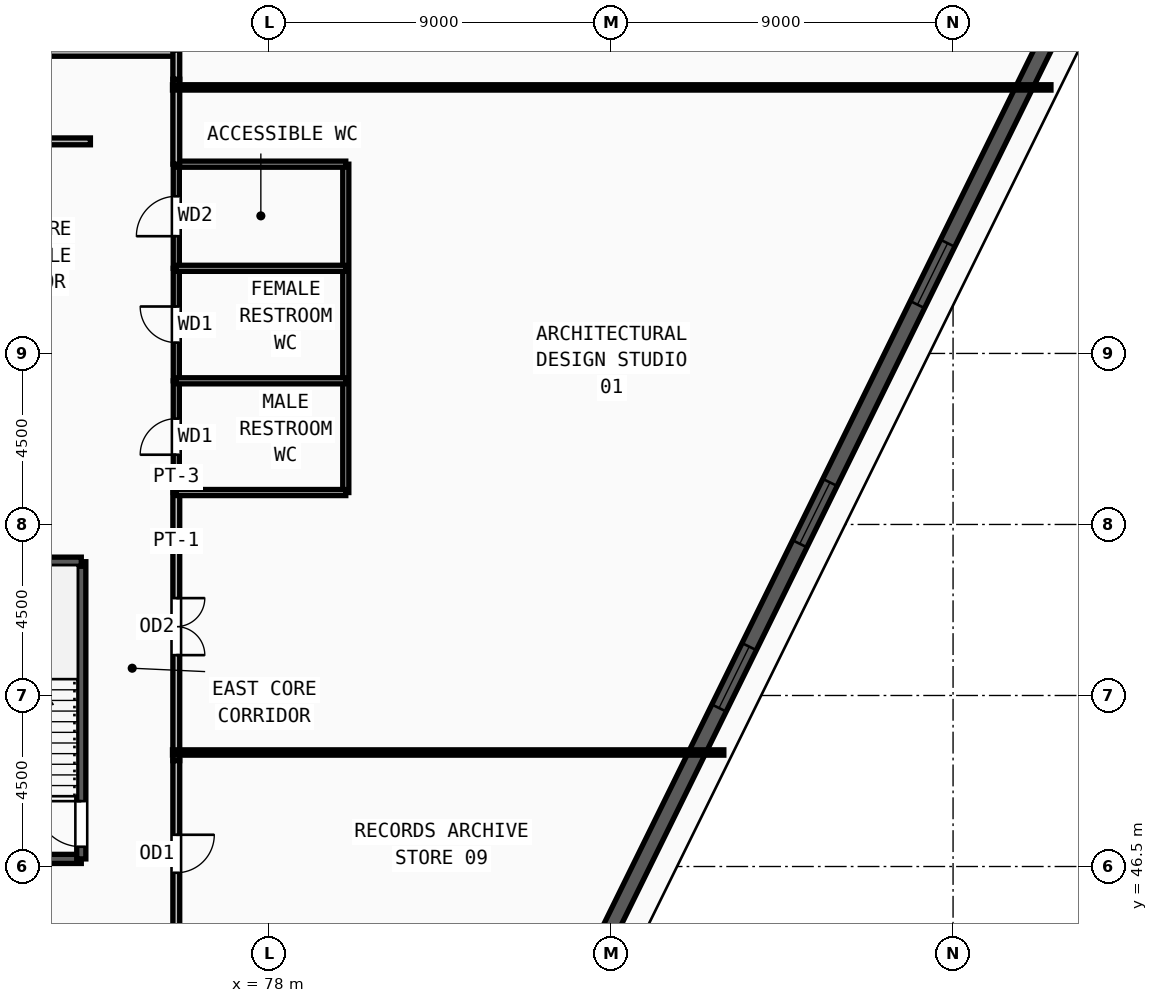
"""IFC4 building model, lengths in metres.
Left out: names, types, materials, properties, quantities, classifications, styles, units other than length and angle.
Written with IfcOpenShell. Run it as: python <this file> out.ifc"""

import sys

from ifc_helpers import new_model, si_unit, direction, frame, frame_2d, origin, place, context, subcontext, project, spatial, rectangle, extrude, source, transform, mapped, element, fill, save


model = new_model("IFC4")
c1 = context("Model", 3, precision=1e-05, world=origin(), true_north=direction((0.0, 1.0)))
c2 = subcontext(c1, "Body", "Model", "MODEL_VIEW")
j1 = project(units=[si_unit("LENGTHUNIT", "METRE"), si_unit("PLANEANGLEUNIT", "RADIAN")], contexts=[c1])
p1 = place(None, origin())
s1 = spatial("IfcSite", under=j1, at=p1, CompositionType="ELEMENT")
p2 = place(p1, origin())
s2 = spatial("IfcBuilding", under=s1, at=p2, CompositionType="ELEMENT")
p3 = place(p2, frame((0.0, 0.0, 39.75)))
s3 = spatial("IfcBuildingStorey", under=s2, at=p3, CompositionType="ELEMENT", Elevation=39.75)
p4 = place(p3, frame((86.172, 43.21, 0.0), z_axis=(0.0, 0.0, 1.0), x_axis=(0.441367208162, 0.897326577985, 0.0)))
e1 = element("IfcWall", 1, at=p4, inside=s3, PredefinedType="SOLIDWALL", context=c2, shape_type="SweptSolid", body=[
    extrude(rectangle(XDim=28.058, YDim=0.42, at=frame_2d((14.029, 0.0))), origin(), (0.0, 0.0, 1.0), 3.57),
])
m1 = source(origin(), c2, "Body", "SweptSolid", [
    extrude(rectangle(XDim=1.8, YDim=1.95, at=frame_2d((0.9, 0.975))), frame((0.0, 0.22, 0.0), z_axis=(0.0, -1.0, 0.0), x_axis=(1.0, 0.0, 0.0)), (0.0, 0.0, 1.0), 0.44),
])
p5 = place(p4, frame((8.314, 0.0, 0.55)))
e2 = element("IfcOpeningElement", 2, at=p5, cuts=e1, PredefinedType="OPENING", context=c2, shape_type="MappedRepresentation", body=[
    mapped(m1, transform((0.0, 0.0, 0.0), x_axis=(1.0, 0.0, 0.0), y_axis=(0.0, 1.0, 0.0), z_axis=(0.0, 0.0, 1.0), scale=1.0)),
])
p6 = place(p4, frame((13.129, 0.0, 0.55)))
e3 = element("IfcOpeningElement", 3, at=p6, cuts=e1, PredefinedType="OPENING", context=c2, shape_type="MappedRepresentation", body=[
    mapped(m1, transform((0.0, 0.0, 0.0), x_axis=(1.0, 0.0, 0.0), y_axis=(0.0, 1.0, 0.0), z_axis=(0.0, 0.0, 1.0), scale=1.0)),
])
p7 = place(p4, frame((20.143, 0.0, 0.55)))
e4 = element("IfcOpeningElement", 4, at=p7, cuts=e1, PredefinedType="OPENING", context=c2, shape_type="MappedRepresentation", body=[
    mapped(m1, transform((0.0, 0.0, 0.0), x_axis=(1.0, 0.0, 0.0), y_axis=(0.0, 1.0, 0.0), z_axis=(0.0, 0.0, 1.0), scale=1.0)),
])
p8 = place(p3, frame((69.62, 46.7, 0.0), z_axis=(0.0, 0.0, 1.0), x_axis=(1.0, 0.0, 0.0)))
e5 = element("IfcWall", 5, at=p8, inside=s3, PredefinedType="SOLIDWALL", context=c2, shape_type="SweptSolid", body=[
    extrude(rectangle(XDim=3.44, YDim=0.24, at=frame_2d((1.72, 0.0))), origin(), (0.0, 0.0, 1.0), 3.57),
])
p9 = place(p3, frame((73.06, 46.7, 0.0), z_axis=(0.0, 0.0, 1.0), x_axis=(0.0, 1.0, 0.0)))
e6 = element("IfcWall", 6, at=p9, inside=s3, PredefinedType="SOLIDWALL", context=c2, shape_type="SweptSolid", body=[
    extrude(rectangle(XDim=7.82, YDim=0.24, at=frame_2d((3.91, 0.0))), origin(), (0.0, 0.0, 1.0), 3.57),
])
m2 = source(origin(), c2, "Body", "SweptSolid", [
    extrude(rectangle(XDim=1.2, YDim=2.2, at=frame_2d((0.6, 1.1))), frame((0.0, 0.13, 0.0), z_axis=(0.0, -1.0, 0.0), x_axis=(1.0, 0.0, 0.0)), (0.0, 0.0, 1.0), 0.26),
])
p10 = place(p9, frame((0.32, 0.0, 0.0)))
e7 = element("IfcOpeningElement", 7, at=p10, cuts=e6, PredefinedType="OPENING", context=c2, shape_type="MappedRepresentation", body=[
    mapped(m2, transform((0.0, 0.0, 0.0), x_axis=(1.0, 0.0, 0.0), y_axis=(0.0, 1.0, 0.0), z_axis=(0.0, 0.0, 1.0), scale=1.0)),
])
p11 = place(p3, frame((73.06, 54.52, 0.0), z_axis=(0.0, 0.0, 1.0), x_axis=(-1.0, 0.0, 0.0)))
e8 = element("IfcWall", 8, at=p11, inside=s3, PredefinedType="SOLIDWALL", context=c2, shape_type="SweptSolid", body=[
    extrude(rectangle(XDim=3.44, YDim=0.24, at=frame_2d((1.72, 0.0))), origin(), (0.0, 0.0, 1.0), 3.57),
])
p12 = place(p3, frame((75.56, 56.34, 0.0), z_axis=(0.0, 0.0, 1.0), x_axis=(0.0, 1.0, 0.0)))
e9 = element("IfcWall", 9, at=p12, inside=s3, PredefinedType="PARTITIONING", context=c2, shape_type="SweptSolid", body=[
    extrude(rectangle(XDim=2.94, YDim=0.16, at=frame_2d((1.47, 0.0))), origin(), (0.0, 0.0, 1.0), 3.57),
])
m3 = source(origin(), c2, "Body", "SweptSolid", [
    extrude(rectangle(XDim=0.95, YDim=2.15, at=frame_2d((0.475, 1.075))), frame((0.0, 0.09, 0.0), z_axis=(0.0, -1.0, 0.0), x_axis=(1.0, 0.0, 0.0)), (0.0, 0.0, 1.0), 0.18),
])
p13 = place(p12, frame((0.995, 0.0, 0.0)))
e10 = element("IfcOpeningElement", 10, at=p13, cuts=e9, PredefinedType="OPENING", context=c2, shape_type="MappedRepresentation", body=[
    mapped(m3, transform((0.0, 0.0, 0.0), x_axis=(1.0, 0.0, 0.0), y_axis=(0.0, 1.0, 0.0), z_axis=(0.0, 0.0, 1.0), scale=1.0)),
])
p14 = place(p3, frame((75.56, 59.28, 0.0), z_axis=(0.0, 0.0, 1.0), x_axis=(0.0, 1.0, 0.0)))
e11 = element("IfcWall", 11, at=p14, inside=s3, PredefinedType="PARTITIONING", context=c2, shape_type="SweptSolid", body=[
    extrude(rectangle(XDim=2.96, YDim=0.16, at=frame_2d((1.48, 0.0))), origin(), (0.0, 0.0, 1.0), 3.57),
])
p15 = place(p14, frame((1.005, 0.0, 0.0)))
e12 = element("IfcOpeningElement", 12, at=p15, cuts=e11, PredefinedType="OPENING", context=c2, shape_type="MappedRepresentation", body=[
    mapped(m3, transform((0.0, 0.0, 0.0), x_axis=(1.0, 0.0, 0.0), y_axis=(0.0, 1.0, 0.0), z_axis=(0.0, 0.0, 1.0), scale=1.0)),
])
p16 = place(p3, frame((75.56, 62.24, 0.0), z_axis=(0.0, 0.0, 1.0), x_axis=(0.0, 1.0, 0.0)))
e13 = element("IfcWall", 13, at=p16, inside=s3, PredefinedType="PARTITIONING", context=c2, shape_type="SweptSolid", body=[
    extrude(rectangle(XDim=2.74, YDim=0.16, at=frame_2d((1.37, 0.0))), origin(), (0.0, 0.0, 1.0), 3.57),
])
m4 = source(origin(), c2, "Body", "SweptSolid", [
    extrude(rectangle(XDim=1.05, YDim=2.15, at=frame_2d((0.525, 1.075))), frame((0.0, 0.09, 0.0), z_axis=(0.0, -1.0, 0.0), x_axis=(1.0, 0.0, 0.0)), (0.0, 0.0, 1.0), 0.18),
])
p17 = place(p16, frame((0.845, 0.0, 0.0)))
e14 = element("IfcOpeningElement", 14, at=p17, cuts=e13, PredefinedType="OPENING", context=c2, shape_type="MappedRepresentation", body=[
    mapped(m4, transform((0.0, 0.0, 0.0), x_axis=(1.0, 0.0, 0.0), y_axis=(0.0, 1.0, 0.0), z_axis=(0.0, 0.0, 1.0), scale=1.0)),
])
p18 = place(p3, frame((69.46, 65.58, 0.0), z_axis=(0.0, 0.0, 1.0), x_axis=(1.0, 0.0, 0.0)))
e15 = element("IfcWall", 15, at=p18, inside=s3, PredefinedType="PARTITIONING", context=c2, shape_type="SweptSolid", body=[
    extrude(rectangle(XDim=3.84, YDim=0.18, at=frame_2d((1.92, 0.0))), origin(), (0.0, 0.0, 1.0), 3.57),
])
m5 = source(origin(), c2, "Body", "SweptSolid", [
    extrude(rectangle(XDim=1.3, YDim=2.2, at=frame_2d((0.65, 1.1))), frame((0.0, 0.1, 0.0), z_axis=(0.0, -1.0, 0.0), x_axis=(1.0, 0.0, 0.0)), (0.0, 0.0, 1.0), 0.2),
])
p19 = place(p18, frame((1.27, 0.0, 0.0)))
e16 = element("IfcOpeningElement", 16, at=p19, cuts=e15, PredefinedType="OPENING", context=c2, shape_type="MappedRepresentation", body=[
    mapped(m5, transform((0.0, 0.0, 0.0), x_axis=(1.0, 0.0, 0.0), y_axis=(0.0, 1.0, 0.0), z_axis=(0.0, 0.0, 1.0), scale=1.0)),
])
p20 = place(p3, frame((75.56, 56.34, 0.0), z_axis=(0.0, 0.0, 1.0), x_axis=(0.0, -1.0, 0.0)))
e17 = element("IfcWall", 17, at=p20, inside=s3, PredefinedType="PARTITIONING", context=c2, shape_type="SweptSolid", body=[
    extrude(rectangle(XDim=7.055, YDim=0.18, at=frame_2d((3.528, 0.0))), origin(), (0.0, 0.0, 1.0), 3.57),
])
m6 = source(origin(), c2, "Body", "SweptSolid", [
    extrude(rectangle(XDim=1.5, YDim=2.2, at=frame_2d((0.75, 1.1))), frame((0.0, 0.1, 0.0), z_axis=(0.0, -1.0, 0.0), x_axis=(1.0, 0.0, 0.0)), (0.0, 0.0, 1.0), 0.2),
])
p21 = place(p20, frame((2.778, 0.0, 0.0)))
e18 = element("IfcOpeningElement", 18, at=p21, cuts=e17, PredefinedType="OPENING", context=c2, shape_type="MappedRepresentation", body=[
    mapped(m6, transform((0.0, 0.0, 0.0), x_axis=(1.0, 0.0, 0.0), y_axis=(0.0, 1.0, 0.0), z_axis=(0.0, 0.0, 1.0), scale=1.0)),
])
p22 = place(p3, frame((55.785, 67.91, 0.0), z_axis=(0.0, 0.0, 1.0), x_axis=(1.0, 0.0, 0.0)))
e19 = element("IfcWall", 19, at=p22, inside=s3, PredefinedType="PARTITIONING", context=c2, shape_type="SweptSolid", body=[
    extrude(rectangle(XDim=19.845, YDim=0.18, at=frame_2d((9.922, 0.0))), origin(), (0.0, 0.0, 1.0), 3.57),
])
p23 = place(p22, frame((9.172, 0.0, 0.0)))
e20 = element("IfcOpeningElement", 20, at=p23, cuts=e19, PredefinedType="OPENING", context=c2, shape_type="MappedRepresentation", body=[
    mapped(m6, transform((0.0, 0.0, 0.0), x_axis=(1.0, 0.0, 0.0), y_axis=(0.0, 1.0, 0.0), z_axis=(0.0, 0.0, 1.0), scale=1.0)),
])
p24 = place(p3, frame((75.56, 49.285, 0.0), z_axis=(0.0, 0.0, 1.0), x_axis=(0.0, -1.0, 0.0)))
e21 = element("IfcWall", 21, at=p24, inside=s3, PredefinedType="PARTITIONING", context=c2, shape_type="SweptSolid", body=[
    extrude(rectangle(XDim=4.9, YDim=0.18, at=frame_2d((2.45, 0.0))), origin(), (0.0, 0.0, 1.0), 3.57),
])
m7 = source(origin(), c2, "Body", "SweptSolid", [
    extrude(rectangle(XDim=1.0, YDim=2.2, at=frame_2d((0.5, 1.1))), frame((0.0, 0.1, 0.0), z_axis=(0.0, -1.0, 0.0), x_axis=(1.0, 0.0, 0.0)), (0.0, 0.0, 1.0), 0.2),
])
p25 = place(p24, frame((1.95, 0.0, 0.0)))
e22 = element("IfcOpeningElement", 22, at=p25, cuts=e21, PredefinedType="OPENING", context=c2, shape_type="MappedRepresentation", body=[
    mapped(m7, transform((0.0, 0.0, 0.0), x_axis=(1.0, 0.0, 0.0), y_axis=(0.0, 1.0, 0.0), z_axis=(0.0, 0.0, 1.0), scale=1.0)),
])
p26 = place(p3, frame((80.02, 56.34, 0.0), z_axis=(0.0, 0.0, 1.0), x_axis=(0.0, 1.0, 0.0)))
e23 = element("IfcWall", 23, at=p26, inside=s3, PredefinedType="PARTITIONING", context=c2, shape_type="SweptSolid", body=[
    extrude(rectangle(XDim=8.64, YDim=0.16, at=frame_2d((4.32, 0.0))), origin(), (0.0, 0.0, 1.0), 3.57),
])
for number, where, z_axis, x_axis in (
    (24, (75.56, 56.34, 0.0), (0.0, 0.0, 1.0), (1.0, 0.0, 0.0)),
    (25, (75.56, 59.28, 0.0), (0.0, 0.0, 1.0), (1.0, 0.0, 0.0)),
    (26, (75.56, 62.24, 0.0), (0.0, 0.0, 1.0), (1.0, 0.0, 0.0)),
    (27, (75.56, 64.98, 0.0), (0.0, 0.0, 1.0), (1.0, 0.0, 0.0)),
):
    element("IfcWall", number, at=place(p3, frame(where, z_axis=z_axis, x_axis=x_axis)), inside=s3, PredefinedType="PARTITIONING", context=c2, shape_type="SweptSolid", body=[
        extrude(rectangle(XDim=4.46, YDim=0.16, at=frame_2d((2.23, 0.0))), origin(), (0.0, 0.0, 1.0), 3.57),
    ])
p27 = place(p3, frame((75.56, 67.215, 0.0), z_axis=(0.0, 0.0, 1.0), x_axis=(0.0, -1.0, 0.0)))
e28 = element("IfcWall", 28, at=p27, inside=s3, PredefinedType="PARTITIONING", context=c2, shape_type="SweptSolid", body=[
    extrude(rectangle(XDim=2.235, YDim=0.18, at=frame_2d((1.118, 0.0))), origin(), (0.0, 0.0, 1.0), 3.57),
])
p28 = place(p3, frame((75.56, 67.98, 0.0), z_axis=(0.0, 0.0, 1.0), x_axis=(0.0, -1.0, 0.0)))
e29 = element("IfcWall", 29, at=p28, inside=s3, PredefinedType="PARTITIONING", context=c2, shape_type="SweptSolid", body=[
    extrude(rectangle(XDim=0.765, YDim=0.18, at=frame_2d((0.382, 0.0))), origin(), (0.0, 0.0, 1.0), 3.57),
])
p29 = place(p3, frame((75.46, 49.5, 0.0), z_axis=(0.0, 0.0, 1.0), x_axis=(1.0, 0.0, 0.0)))
e30 = element("IfcWall", 30, at=p29, inside=s3, PredefinedType="PARTITIONING", context=c2, shape_type="SweptSolid", body=[
    extrude(rectangle(XDim=14.508, YDim=0.14, at=frame_2d((7.254, 0.0))), origin(), (0.0, 0.0, 1.0), 3.57),
])
p30 = place(p3, frame((75.46, 67.0, 0.0), z_axis=(0.0, 0.0, 1.0), x_axis=(1.0, 0.0, 0.0)))
e31 = element("IfcWall", 31, at=p30, inside=s3, PredefinedType="PARTITIONING", context=c2, shape_type="SweptSolid", body=[
    extrude(rectangle(XDim=23.116, YDim=0.14, at=frame_2d((11.558, 0.0))), origin(), (0.0, 0.0, 1.0), 2.655),
])
m8 = source(origin(), c2, "Body", "SweptSolid", [
    extrude(rectangle(XDim=1.8, YDim=1.95, at=frame_2d((0.9, 0.975))), frame((0.0, 0.03, 0.0), z_axis=(0.0, -1.0, 0.0), x_axis=(1.0, 0.0, 0.0)), (0.0, 0.0, 1.0), 0.06),
])
p31 = place(p5, origin())
e32 = element("IfcWindow", 32, at=p31, inside=s3, PartitioningType="DOUBLE_PANEL_VERTICAL", PredefinedType="WINDOW", context=c2, shape_type="MappedRepresentation", body=[
    mapped(m8, transform((0.0, 0.0, 0.0), x_axis=(1.0, 0.0, 0.0), y_axis=(0.0, 1.0, 0.0), z_axis=(0.0, 0.0, 1.0), scale=1.0)),
])
fill(e2, e32)
p32 = place(p6, origin())
e33 = element("IfcWindow", 33, at=p32, inside=s3, PartitioningType="DOUBLE_PANEL_VERTICAL", PredefinedType="WINDOW", context=c2, shape_type="MappedRepresentation", body=[
    mapped(m8, transform((0.0, 0.0, 0.0), x_axis=(1.0, 0.0, 0.0), y_axis=(0.0, 1.0, 0.0), z_axis=(0.0, 0.0, 1.0), scale=1.0)),
])
fill(e3, e33)
p33 = place(p7, origin())
e34 = element("IfcWindow", 34, at=p33, inside=s3, PartitioningType="DOUBLE_PANEL_VERTICAL", PredefinedType="WINDOW", context=c2, shape_type="MappedRepresentation", body=[
    mapped(m8, transform((0.0, 0.0, 0.0), x_axis=(1.0, 0.0, 0.0), y_axis=(0.0, 1.0, 0.0), z_axis=(0.0, 0.0, 1.0), scale=1.0)),
])
fill(e4, e34)
m9 = source(origin(), c2, "Body", "SweptSolid", [
    extrude(rectangle(XDim=1.2, YDim=2.2, at=frame_2d((0.6, 1.1))), frame((0.0, 0.025, 0.0), z_axis=(0.0, -1.0, 0.0), x_axis=(1.0, 0.0, 0.0)), (0.0, 0.0, 1.0), 0.05),
])
p34 = place(p10, origin())
e35 = element("IfcDoor", 35, at=p34, inside=s3, OperationType="SINGLE_SWING_RIGHT", PredefinedType="DOOR", context=c2, shape_type="MappedRepresentation", body=[
    mapped(m9, transform((0.0, 0.0, 0.0), x_axis=(1.0, 0.0, 0.0), y_axis=(0.0, 1.0, 0.0), z_axis=(0.0, 0.0, 1.0), scale=1.0)),
])
fill(e7, e35)
m10 = source(origin(), c2, "Body", "SweptSolid", [
    extrude(rectangle(XDim=0.95, YDim=2.15, at=frame_2d((0.475, 1.075))), frame((0.0, 0.025, 0.0), z_axis=(0.0, -1.0, 0.0), x_axis=(1.0, 0.0, 0.0)), (0.0, 0.0, 1.0), 0.05),
])
p35 = place(p13, origin())
e36 = element("IfcDoor", 36, at=p35, inside=s3, OperationType="SINGLE_SWING_LEFT", PredefinedType="DOOR", context=c2, shape_type="MappedRepresentation", body=[
    mapped(m10, transform((0.0, 0.0, 0.0), x_axis=(1.0, 0.0, 0.0), y_axis=(0.0, 1.0, 0.0), z_axis=(0.0, 0.0, 1.0), scale=1.0)),
])
fill(e10, e36)
p36 = place(p15, origin())
e37 = element("IfcDoor", 37, at=p36, inside=s3, OperationType="SINGLE_SWING_RIGHT", PredefinedType="DOOR", context=c2, shape_type="MappedRepresentation", body=[
    mapped(m10, transform((0.0, 0.0, 0.0), x_axis=(1.0, 0.0, 0.0), y_axis=(0.0, 1.0, 0.0), z_axis=(0.0, 0.0, 1.0), scale=1.0)),
])
fill(e12, e37)
m11 = source(origin(), c2, "Body", "SweptSolid", [
    extrude(rectangle(XDim=1.05, YDim=2.15, at=frame_2d((0.525, 1.075))), frame((0.0, 0.025, 0.0), z_axis=(0.0, -1.0, 0.0), x_axis=(1.0, 0.0, 0.0)), (0.0, 0.0, 1.0), 0.05),
])
p37 = place(p17, origin())
e38 = element("IfcDoor", 38, at=p37, inside=s3, OperationType="SINGLE_SWING_LEFT", PredefinedType="DOOR", context=c2, shape_type="MappedRepresentation", body=[
    mapped(m11, transform((0.0, 0.0, 0.0), x_axis=(1.0, 0.0, 0.0), y_axis=(0.0, 1.0, 0.0), z_axis=(0.0, 0.0, 1.0), scale=1.0)),
])
fill(e14, e38)
m12 = source(origin(), c2, "Body", "SweptSolid", [
    extrude(rectangle(XDim=1.5, YDim=2.2, at=frame_2d((0.75, 1.1))), frame((0.0, 0.025, 0.0), z_axis=(0.0, -1.0, 0.0), x_axis=(1.0, 0.0, 0.0)), (0.0, 0.0, 1.0), 0.05),
])
p38 = place(p21, origin())
e39 = element("IfcDoor", 39, at=p38, inside=s3, OperationType="DOUBLE_DOOR_SINGLE_SWING", PredefinedType="DOOR", context=c2, shape_type="MappedRepresentation", body=[
    mapped(m12, transform((0.0, 0.0, 0.0), x_axis=(1.0, 0.0, 0.0), y_axis=(0.0, 1.0, 0.0), z_axis=(0.0, 0.0, 1.0), scale=1.0)),
])
fill(e18, e39)
m13 = source(origin(), c2, "Body", "SweptSolid", [
    extrude(rectangle(XDim=1.0, YDim=2.2, at=frame_2d((0.5, 1.1))), frame((0.0, 0.025, 0.0), z_axis=(0.0, -1.0, 0.0), x_axis=(1.0, 0.0, 0.0)), (0.0, 0.0, 1.0), 0.05),
])
p39 = place(p25, origin())
e40 = element("IfcDoor", 40, at=p39, inside=s3, OperationType="SINGLE_SWING_LEFT", PredefinedType="DOOR", context=c2, shape_type="MappedRepresentation", body=[
    mapped(m13, transform((0.0, 0.0, 0.0), x_axis=(1.0, 0.0, 0.0), y_axis=(0.0, 1.0, 0.0), z_axis=(0.0, 0.0, 1.0), scale=1.0)),
])
fill(e22, e40)
save(model, sys.argv[1])
